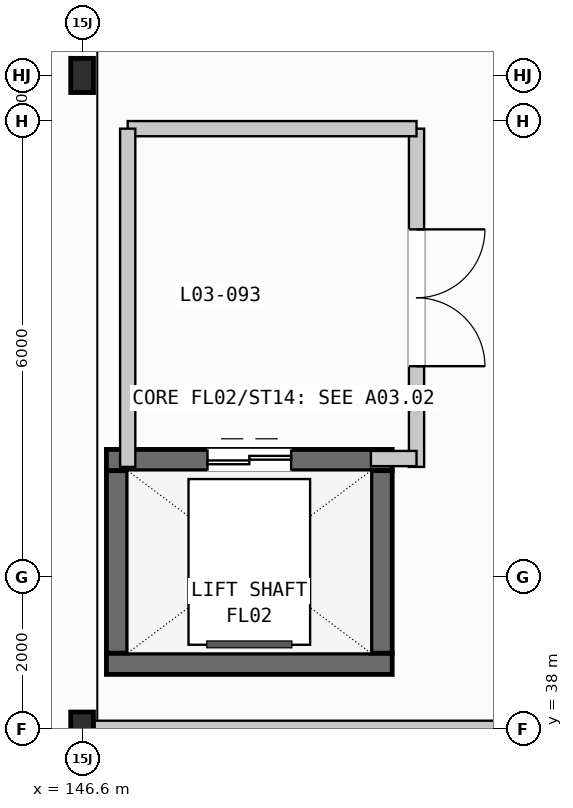
"""IFC4 building model, lengths in metres.
Left out: names, types, materials, properties, quantities, classifications, styles, units other than length and angle.
Written with IfcOpenShell. Run it as: python <this file> out.ifc"""

import sys

from ifc_helpers import new_model, si_unit, direction, frame, frame_2d, origin, origin_2d, place, context, subcontext, project, spatial, rectangle, i_section, extrude, element, fill, save


model = new_model("IFC4")
c1 = context("Model", 3, precision=1e-05, world=origin(), true_north=direction((0.0, 1.0)))
c2 = subcontext(c1, "Body", "Model", "MODEL_VIEW")
j1 = project(units=[si_unit("LENGTHUNIT", "METRE"), si_unit("PLANEANGLEUNIT", "RADIAN")], contexts=[c1])
p1 = place(None, origin())
s1 = spatial("IfcSite", under=j1, at=p1, CompositionType="ELEMENT")
p2 = place(p1, origin())
s2 = spatial("IfcBuilding", under=s1, at=p2, CompositionType="ELEMENT")
p3 = place(p2, frame((0.0, 0.0, 16.8)))
s3 = spatial("IfcBuildingStorey", under=s2, at=p3, CompositionType="ELEMENT", Elevation=16.8)
for number, where, z_axis, x_axis in (
    (1, (146.6, 38.0, 0.0), (0.0, 0.0, 1.0), (1.0, 0.0, 0.0)),
    (2, (146.6, 46.6, 0.0), (0.0, 0.0, 1.0), (1.0, 0.0, 0.0)),
):
    element("IfcColumn", number, at=place(p3, frame(where, z_axis=z_axis, x_axis=x_axis)), inside=s3, PredefinedType="COLUMN", context=c2, shape_type="SweptSolid", body=[
        extrude(i_section(OverallWidth=0.3, OverallDepth=0.45, WebThickness=0.014, FlangeThickness=0.026, FilletRadius=0.027, at=origin_2d()), origin(), (0.0, 0.0, 1.0), 4.8),
    ])
p4 = place(p3, frame((146.92, 38.86, 0.0), z_axis=(0.0, 0.0, 1.0), x_axis=(1.0, 0.0, 0.0)))
e3 = element("IfcWall", 3, at=p4, inside=s3, PredefinedType="SHEAR", context=c2, shape_type="SweptSolid", body=[
    extrude(rectangle(XDim=3.76, YDim=0.28, at=frame_2d((1.88, 0.0))), origin(), (0.0, 0.0, 1.0), 4.8),
])
p5 = place(p3, frame((146.92, 41.54, 0.0), z_axis=(0.0, 0.0, 1.0), x_axis=(1.0, 0.0, 0.0)))
e4 = element("IfcWall", 4, at=p5, inside=s3, PredefinedType="SHEAR", context=c2, shape_type="SweptSolid", body=[
    extrude(rectangle(XDim=3.76, YDim=0.28, at=frame_2d((1.88, 0.0))), origin(), (0.0, 0.0, 1.0), 4.8),
])
p6 = place(p5, frame((1.33, 0.0, 0.0)))
e5 = element("IfcOpeningElement", 5, at=p6, cuts=e4, PredefinedType="OPENING", context=c2, shape_type="SweptSolid", body=[
    extrude(rectangle(XDim=1.1, YDim=2.15, at=frame_2d((0.55, 1.075))), frame((0.0, 0.15, 0.0), z_axis=(0.0, -1.0, 0.0), x_axis=(1.0, 0.0, 0.0)), (0.0, 0.0, 1.0), 0.3),
])
for number, where, z_axis, x_axis in (
    (6, (147.06, 39.0, 0.0), (0.0, 0.0, 1.0), (0.0, 1.0, 0.0)),
    (7, (150.54, 39.0, 0.0), (0.0, 0.0, 1.0), (0.0, 1.0, 0.0)),
):
    element("IfcWall", number, at=place(p3, frame(where, z_axis=z_axis, x_axis=x_axis)), inside=s3, PredefinedType="SHEAR", context=c2, shape_type="SweptSolid", body=[
        extrude(rectangle(XDim=2.4, YDim=0.28, at=frame_2d((1.2, 0.0))), origin(), (0.0, 0.0, 1.0), 4.8),
    ])
p7 = place(p3, frame((146.746, 38.0, 0.0), z_axis=(0.0, 0.0, 1.0), x_axis=(1.0, 0.0, 0.0)))
e8 = element("IfcWall", 8, at=p7, inside=s3, PredefinedType="STANDARD", context=c2, shape_type="SweptSolid", body=[
    extrude(rectangle(XDim=8.108, YDim=0.222, at=frame_2d((4.054, 0.0))), origin(), (0.0, 0.0, 1.0), 3.965),
])
p8 = place(p3, frame((151.0, 41.45, 0.0), z_axis=(0.0, 0.0, 1.0), x_axis=(0.0, 1.0, 0.0)))
e9 = element("IfcWall", 9, at=p8, inside=s3, PredefinedType="PARTITIONING", context=c2, shape_type="SweptSolid", body=[
    extrude(rectangle(XDim=4.45, YDim=0.2, at=frame_2d((2.225, 0.0))), origin(), (0.0, 0.0, 1.0), 4.0),
])
p9 = place(p8, frame((1.325, 0.0, 0.0)))
e10 = element("IfcOpeningElement", 10, at=p9, cuts=e9, PredefinedType="OPENING", context=c2, shape_type="SweptSolid", body=[
    extrude(rectangle(XDim=1.8, YDim=2.2, at=frame_2d((0.9, 1.1))), frame((0.0, 0.11, 0.0), z_axis=(0.0, -1.0, 0.0), x_axis=(1.0, 0.0, 0.0)), (0.0, 0.0, 1.0), 0.22),
])
p10 = place(p3, frame((147.2, 45.9, 0.0), z_axis=(0.0, 0.0, 1.0), x_axis=(1.0, 0.0, 0.0)))
e11 = element("IfcWall", 11, at=p10, inside=s3, PredefinedType="PARTITIONING", context=c2, shape_type="SweptSolid", body=[
    extrude(rectangle(XDim=3.8, YDim=0.2, at=frame_2d((1.9, 0.0))), origin(), (0.0, 0.0, 1.0), 4.0),
])
p11 = place(p3, frame((147.2, 41.45, 0.0), z_axis=(0.0, 0.0, 1.0), x_axis=(0.0, 1.0, 0.0)))
e12 = element("IfcWall", 12, at=p11, inside=s3, PredefinedType="PARTITIONING", context=c2, shape_type="SweptSolid", body=[
    extrude(rectangle(XDim=4.45, YDim=0.2, at=frame_2d((2.225, 0.0))), origin(), (0.0, 0.0, 1.0), 4.0),
])
p12 = place(p3, frame((150.4, 41.56, 0.0), z_axis=(0.0, 0.0, 1.0), x_axis=(1.0, 0.0, 0.0)))
e13 = element("IfcWall", 13, at=p12, inside=s3, PredefinedType="PARTITIONING", context=c2, shape_type="SweptSolid", body=[
    extrude(rectangle(XDim=0.6, YDim=0.2, at=frame_2d((0.3, 0.0))), origin(), (0.0, 0.0, 1.0), 4.0),
])
p13 = place(p6, origin())
e14 = element("IfcDoor", 14, at=p13, inside=s3, OperationType="DOUBLE_DOOR_SLIDING", PredefinedType="DOOR", context=c2, shape_type="SweptSolid", body=[
    extrude(rectangle(XDim=1.1, YDim=2.15, at=frame_2d((0.55, 1.075))), frame((0.0, 0.025, 0.0), z_axis=(0.0, -1.0, 0.0), x_axis=(1.0, 0.0, 0.0)), (0.0, 0.0, 1.0), 0.05),
])
fill(e5, e14)
p14 = place(p9, frame((1.8, 0.0, 0.0), z_axis=(0.0, 0.0, 1.0), x_axis=(-1.0, 0.0, 0.0)))
e15 = element("IfcDoor", 15, at=p14, inside=s3, OperationType="DOUBLE_DOOR_SINGLE_SWING", PredefinedType="DOOR", context=c2, shape_type="SweptSolid", body=[
    extrude(rectangle(XDim=1.8, YDim=2.2, at=frame_2d((0.9, 1.1))), frame((0.0, 0.025, 0.0), z_axis=(0.0, -1.0, 0.0), x_axis=(1.0, 0.0, 0.0)), (0.0, 0.0, 1.0), 0.05),
])
fill(e10, e15)
save(model, sys.argv[1])
